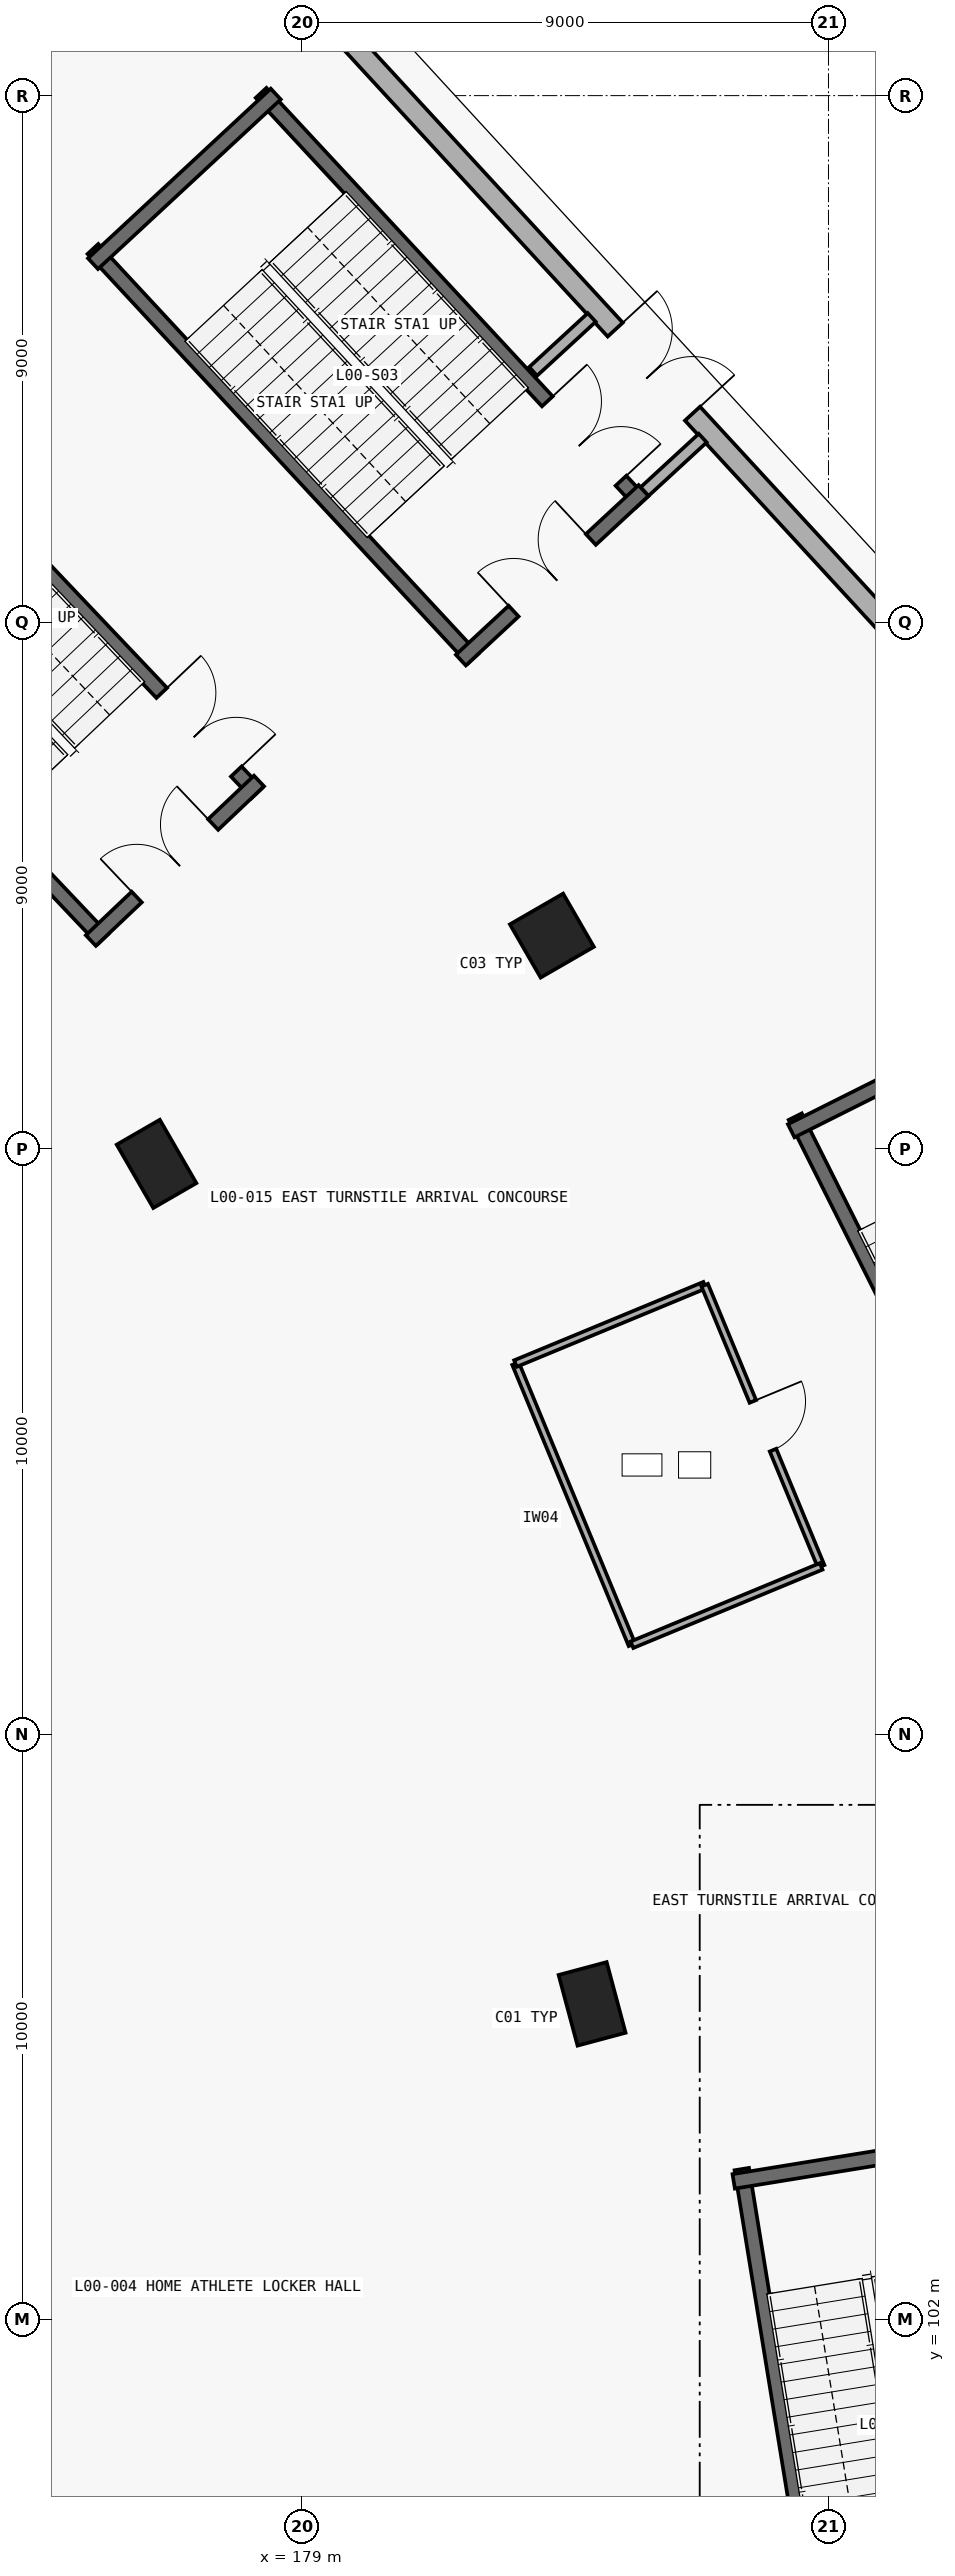
"""IFC4 building model, lengths in metres.
Left out: names, types, materials, properties, quantities, classifications, styles, units other than length and angle.
Written with IfcOpenShell. Run it as: python <this file> out.ifc"""

import sys

from ifc_helpers import new_model, si_unit, direction, frame, frame_2d, origin, origin_2d, place, context, subcontext, project, spatial, rectangle, extrude, element, fill, save


model = new_model("IFC4")
c1 = context("Model", 3, precision=1e-05, world=origin(), true_north=direction((0.0, 1.0)))
c2 = subcontext(c1, "Body", "Model", "MODEL_VIEW")
j1 = project(units=[si_unit("LENGTHUNIT", "METRE"), si_unit("PLANEANGLEUNIT", "RADIAN")], contexts=[c1])
p1 = place(None, origin())
s1 = spatial("IfcSite", under=j1, at=p1, CompositionType="ELEMENT")
p2 = place(p1, origin())
s2 = spatial("IfcBuilding", under=s1, at=p2, CompositionType="ELEMENT")
p3 = place(p2, origin())
s3 = spatial("IfcBuildingStorey", under=s2, at=p3, CompositionType="ELEMENT", Elevation=0.0)
for number, where, z_axis, x_axis in (
    (1, (183.961, 107.4, 0.0), (0.0, 0.0, 1.0), (0.966, 0.259, 0.0)),
    (2, (176.519, 121.75, 0.0), (0.0, 0.0, 1.0), (0.866, 0.5, 0.0)),
):
    element("IfcColumn", number, at=place(p3, frame(where, z_axis=z_axis, x_axis=x_axis)), inside=s3, PredefinedType="COLUMN", context=c2, shape_type="SweptSolid", body=[
        extrude(rectangle(XDim=0.85, YDim=1.25, at=origin_2d()), origin(), (0.0, 0.0, 1.0), 5.4),
    ])
p4 = place(p3, frame((183.274, 125.65, 0.0), z_axis=(0.0, 0.0, 1.0), x_axis=(0.866025403784, 0.5, 0.0)))
e3 = element("IfcColumn", 3, at=p4, inside=s3, PredefinedType="COLUMN", context=c2, shape_type="SweptSolid", body=[
    extrude(rectangle(XDim=1.05, YDim=1.05, at=origin_2d()), origin(), (0.0, 0.0, 1.0), 5.4),
])
p5 = place(p3, frame((176.208, 144.858, 0.0), z_axis=(0.0, 0.0, 1.0), x_axis=(0.677106454921, -0.735885078462, 0.0)))
e4 = element("IfcWall", 4, at=p5, inside=s3, PredefinedType="STANDARD", context=c2, shape_type="SweptSolid", body=[
    extrude(rectangle(XDim=20.128, YDim=0.35, at=frame_2d((10.064, 0.0))), origin(), (0.0, 0.0, 1.0), 4.165),
])
p6 = place(p5, frame((12.034, 0.0, 0.0)))
e5 = element("IfcOpeningElement", 5, at=p6, cuts=e4, PredefinedType="OPENING", context=c2, shape_type="SweptSolid", body=[
    extrude(rectangle(XDim=1.95, YDim=2.25, at=frame_2d((0.975, 1.125))), frame((0.0, 0.185, 0.0), z_axis=(0.0, -1.0, 0.0), x_axis=(1.0, 0.0, 0.0)), (0.0, 0.0, 1.0), 0.37),
])
p7 = place(p5, frame((1.218, 0.0, 0.0)))
e6 = element("IfcOpeningElement", 6, at=p7, cuts=e4, PredefinedType="OPENING", context=c2, shape_type="SweptSolid", body=[
    extrude(rectangle(XDim=3.2, YDim=2.6, at=frame_2d((1.6, 1.3))), frame((0.0, 0.185, 0.0), z_axis=(0.0, -1.0, 0.0), x_axis=(1.0, 0.0, 0.0)), (0.0, 0.0, 1.0), 0.37),
])
p8 = place(p3, frame((187.432, 122.557, 0.0), z_axis=(0.0, 0.0, 1.0), x_axis=(0.447919041961, -0.894074119885, 0.0)))
e7 = element("IfcWall", 7, at=p8, inside=s3, PredefinedType="SHEAR", context=c2, shape_type="SweptSolid", body=[
    extrude(rectangle(XDim=9.55, YDim=0.25, at=frame_2d((4.775, 0.0))), origin(), (0.0, 0.0, 1.0), 5.1),
])
p9 = place(p3, frame((191.172, 124.223, 0.0), z_axis=(0.0, 0.0, 1.0), x_axis=(-0.89409454548, -0.447878268888, 0.0)))
e8 = element("IfcWall", 8, at=p9, inside=s3, PredefinedType="SHEAR", context=c2, shape_type="SweptSolid", body=[
    extrude(rectangle(XDim=4.26, YDim=0.25, at=frame_2d((2.13, 0.0))), origin(), (0.0, 0.0, 1.0), 5.1),
])
p10 = place(p3, frame((178.305, 140.047, 0.0), z_axis=(0.0, 0.0, 1.0), x_axis=(0.680258890476, -0.732971924379, 0.0)))
e9 = element("IfcWall", 9, at=p10, inside=s3, PredefinedType="SHEAR", context=c2, shape_type="SweptSolid", body=[
    extrude(rectangle(XDim=9.55, YDim=0.25, at=frame_2d((4.775, 0.0))), origin(), (0.0, 0.0, 1.0), 5.1),
])
p11 = place(p10, frame((7.19, 0.0, 0.0)))
e10 = element("IfcOpeningElement", 10, at=p11, cuts=e9, PredefinedType="OPENING", context=c2, shape_type="SweptSolid", body=[
    extrude(rectangle(XDim=1.85, YDim=2.3, at=frame_2d((0.925, 1.15))), frame((0.0, 0.135, 0.0), z_axis=(0.0, -1.0, 0.0), x_axis=(1.0, 0.0, 0.0)), (0.0, 0.0, 1.0), 0.27),
])
p12 = place(p3, frame((175.432, 137.38, 0.0), z_axis=(0.0, 0.0, 1.0), x_axis=(0.680271637111, -0.732960094236, 0.0)))
e11 = element("IfcWall", 11, at=p12, inside=s3, PredefinedType="SHEAR", context=c2, shape_type="SweptSolid", body=[
    extrude(rectangle(XDim=9.55, YDim=0.25, at=frame_2d((4.775, 0.0))), origin(), (0.0, 0.0, 1.0), 5.1),
])
p13 = place(p3, frame((181.719, 130.356, 0.0), z_axis=(0.0, 0.0, 1.0), x_axis=(0.732977166505, 0.680253242096, 0.0)))
e12 = element("IfcWall", 12, at=p13, inside=s3, PredefinedType="SHEAR", context=c2, shape_type="SweptSolid", body=[
    extrude(rectangle(XDim=4.26, YDim=0.25, at=frame_2d((2.13, 0.0))), origin(), (0.0, 0.0, 1.0), 5.1),
])
p14 = place(p13, frame((1.23, 0.0, 0.0)))
e13 = element("IfcOpeningElement", 13, at=p14, cuts=e12, PredefinedType="OPENING", context=c2, shape_type="SweptSolid", body=[
    extrude(rectangle(XDim=1.8, YDim=2.25, at=frame_2d((0.9, 1.125))), frame((0.0, 0.135, 0.0), z_axis=(0.0, -1.0, 0.0), x_axis=(1.0, 0.0, 0.0)), (0.0, 0.0, 1.0), 0.27),
])
p15 = place(p3, frame((178.556, 140.027, 0.0), z_axis=(0.0, 0.0, 1.0), x_axis=(-0.73295064559, -0.680281817433, 0.0)))
e14 = element("IfcWall", 14, at=p15, inside=s3, PredefinedType="SHEAR", context=c2, shape_type="SweptSolid", body=[
    extrude(rectangle(XDim=4.26, YDim=0.25, at=frame_2d((2.13, 0.0))), origin(), (0.0, 0.0, 1.0), 5.1),
])
p16 = place(p3, frame((186.519, 104.578, 0.0), z_axis=(0.0, 0.0, 1.0), x_axis=(0.160690234322, -0.987004887827, 0.0)))
e15 = element("IfcWall", 15, at=p16, inside=s3, PredefinedType="SHEAR", context=c2, shape_type="SweptSolid", body=[
    extrude(rectangle(XDim=9.45, YDim=0.25, at=frame_2d((4.725, 0.0))), origin(), (0.0, 0.0, 1.0), 5.1),
])
p17 = place(p3, frame((190.289, 105.004, 0.0), z_axis=(0.0, 0.0, 1.0), x_axis=(-0.987009998221, -0.160658841684, 0.0)))
e16 = element("IfcWall", 16, at=p17, inside=s3, PredefinedType="SHEAR", context=c2, shape_type="SweptSolid", body=[
    extrude(rectangle(XDim=3.96, YDim=0.25, at=frame_2d((1.98, 0.0))), origin(), (0.0, 0.0, 1.0), 5.1),
])
p18 = place(p3, frame((171.728, 134.939, 0.0), z_axis=(0.0, 0.0, 1.0), x_axis=(0.68832701945, -0.725400519916, 0.0)))
e17 = element("IfcWall", 17, at=p18, inside=s3, PredefinedType="SHEAR", context=c2, shape_type="SweptSolid", body=[
    extrude(rectangle(XDim=9.45, YDim=0.25, at=frame_2d((4.725, 0.0))), origin(), (0.0, 0.0, 1.0), 5.1),
])
p19 = place(p18, frame((7.09, 0.0, 0.0)))
e18 = element("IfcOpeningElement", 18, at=p19, cuts=e17, PredefinedType="OPENING", context=c2, shape_type="SweptSolid", body=[
    extrude(rectangle(XDim=1.85, YDim=2.3, at=frame_2d((0.925, 1.15))), frame((0.0, 0.135, 0.0), z_axis=(0.0, -1.0, 0.0), x_axis=(1.0, 0.0, 0.0)), (0.0, 0.0, 1.0), 0.27),
])
p20 = place(p3, frame((169.102, 132.447, 0.0), z_axis=(0.0, 0.0, 1.0), x_axis=(0.68832701945, -0.725400519916, 0.0)))
e19 = element("IfcWall", 19, at=p20, inside=s3, PredefinedType="SHEAR", context=c2, shape_type="SweptSolid", body=[
    extrude(rectangle(XDim=9.45, YDim=0.25, at=frame_2d((4.725, 0.0))), origin(), (0.0, 0.0, 1.0), 5.1),
])
p21 = place(p3, frame((175.397, 125.566, 0.0), z_axis=(0.0, 0.0, 1.0), x_axis=(0.725390288694, 0.688337801569, 0.0)))
e20 = element("IfcWall", 20, at=p21, inside=s3, PredefinedType="SHEAR", context=c2, shape_type="SweptSolid", body=[
    extrude(rectangle(XDim=3.96, YDim=0.25, at=frame_2d((1.98, 0.0))), origin(), (0.0, 0.0, 1.0), 5.1),
])
p22 = place(p21, frame((1.08, 0.0, 0.0)))
e21 = element("IfcOpeningElement", 21, at=p22, cuts=e20, PredefinedType="OPENING", context=c2, shape_type="SweptSolid", body=[
    extrude(rectangle(XDim=1.8, YDim=2.25, at=frame_2d((0.9, 1.125))), frame((0.0, 0.135, 0.0), z_axis=(0.0, -1.0, 0.0), x_axis=(1.0, 0.0, 0.0)), (0.0, 0.0, 1.0), 0.27),
])
p23 = place(p3, frame((184.858, 133.236, 0.0), z_axis=(0.0, 0.0, 1.0), x_axis=(0.735725414691, 0.677279937823, 0.0)))
e22 = element("IfcWall", 22, at=p23, inside=s3, PredefinedType="PARTITIONING", context=c2, shape_type="SweptSolid", body=[
    extrude(rectangle(XDim=1.349, YDim=0.2, at=frame_2d((0.675, 0.0))), origin(), (0.0, 0.0, 1.0), 4.165),
])
p24 = place(p3, frame((182.954, 135.288, 0.0), z_axis=(0.0, 0.0, 1.0), x_axis=(0.73582732187, 0.677169219907, 0.0)))
e23 = element("IfcWall", 23, at=p24, inside=s3, PredefinedType="PARTITIONING", context=c2, shape_type="SweptSolid", body=[
    extrude(rectangle(XDim=1.361, YDim=0.2, at=frame_2d((0.681, 0.0))), origin(), (0.0, 0.0, 1.0), 4.165),
])
p25 = place(p3, frame((184.642, 113.535, 0.0), z_axis=(0.0, 0.0, 1.0), x_axis=(-0.38268766097, 0.923877780955, 0.0)))
e24 = element("IfcWall", 24, at=p25, inside=s3, PredefinedType="PARTITIONING", context=c2, shape_type="SweptSolid", body=[
    extrude(rectangle(XDim=5.2, YDim=0.12, at=frame_2d((2.6, 0.0))), origin(), (0.0, 0.0, 1.0), 4.617),
])
p26 = place(p3, frame((182.652, 118.339, 0.0), z_axis=(0.0, 0.0, 1.0), x_axis=(0.923904592733, 0.382622926034, 0.0)))
e25 = element("IfcWall", 25, at=p26, inside=s3, PredefinedType="PARTITIONING", context=c2, shape_type="SweptSolid", body=[
    extrude(rectangle(XDim=3.499, YDim=0.12, at=frame_2d((1.75, 0.0))), origin(), (0.0, 0.0, 1.0), 4.415),
])
p27 = place(p3, frame((185.885, 119.678, 0.0), z_axis=(0.0, 0.0, 1.0), x_axis=(0.382704261034, -0.923870904719, 0.0)))
e26 = element("IfcWall", 26, at=p27, inside=s3, PredefinedType="PARTITIONING", context=c2, shape_type="SweptSolid", body=[
    extrude(rectangle(XDim=5.2, YDim=0.12, at=frame_2d((2.6, 0.0))), origin(), (0.0, 0.0, 1.0), 4.415),
])
p28 = place(p27, frame((2.15, 0.0, 0.0)))
e27 = element("IfcOpeningElement", 27, at=p28, cuts=e26, PredefinedType="OPENING", context=c2, shape_type="SweptSolid", body=[
    extrude(rectangle(XDim=0.9, YDim=2.1, at=frame_2d((0.45, 1.05))), frame((0.0, 0.07, 0.0), z_axis=(0.0, -1.0, 0.0), x_axis=(1.0, 0.0, 0.0)), (0.0, 0.0, 1.0), 0.14),
])
p29 = place(p3, frame((187.875, 114.874, 0.0), z_axis=(0.0, 0.0, 1.0), x_axis=(-0.923879927009, -0.382682479961, 0.0)))
e28 = element("IfcWall", 28, at=p29, inside=s3, PredefinedType="PARTITIONING", context=c2, shape_type="SweptSolid", body=[
    extrude(rectangle(XDim=3.499, YDim=0.12, at=frame_2d((1.75, 0.0))), origin(), (0.0, 0.0, 1.0), 4.617),
])
p30 = place(p6, origin())
e29 = element("IfcDoor", 29, at=p30, inside=s3, OperationType="DOUBLE_DOOR_SINGLE_SWING", PredefinedType="DOOR", context=c2, shape_type="SweptSolid", body=[
    extrude(rectangle(XDim=1.95, YDim=2.25, at=frame_2d((0.975, 1.125))), frame((0.0, 0.025, 0.0), z_axis=(0.0, -1.0, 0.0), x_axis=(1.0, 0.0, 0.0)), (0.0, 0.0, 1.0), 0.05),
])
fill(e5, e29)
p31 = place(p14, origin())
e30 = element("IfcDoor", 30, at=p31, inside=s3, OperationType="DOUBLE_DOOR_SINGLE_SWING", PredefinedType="DOOR", context=c2, shape_type="SweptSolid", body=[
    extrude(rectangle(XDim=1.8, YDim=2.25, at=frame_2d((0.9, 1.125))), frame((0.0, 0.025, 0.0), z_axis=(0.0, -1.0, 0.0), x_axis=(1.0, 0.0, 0.0)), (0.0, 0.0, 1.0), 0.05),
])
fill(e13, e30)
p32 = place(p11, origin())
e31 = element("IfcDoor", 31, at=p32, inside=s3, OperationType="DOUBLE_DOOR_SINGLE_SWING", PredefinedType="DOOR", context=c2, shape_type="SweptSolid", body=[
    extrude(rectangle(XDim=1.85, YDim=2.3, at=frame_2d((0.925, 1.15))), frame((0.0, 0.025, 0.0), z_axis=(0.0, -1.0, 0.0), x_axis=(1.0, 0.0, 0.0)), (0.0, 0.0, 1.0), 0.05),
])
fill(e10, e31)
p33 = place(p22, origin())
e32 = element("IfcDoor", 32, at=p33, inside=s3, OperationType="DOUBLE_DOOR_SINGLE_SWING", PredefinedType="DOOR", context=c2, shape_type="SweptSolid", body=[
    extrude(rectangle(XDim=1.8, YDim=2.25, at=frame_2d((0.9, 1.125))), frame((0.0, 0.025, 0.0), z_axis=(0.0, -1.0, 0.0), x_axis=(1.0, 0.0, 0.0)), (0.0, 0.0, 1.0), 0.05),
])
fill(e21, e32)
p34 = place(p19, origin())
e33 = element("IfcDoor", 33, at=p34, inside=s3, OperationType="DOUBLE_DOOR_SINGLE_SWING", PredefinedType="DOOR", context=c2, shape_type="SweptSolid", body=[
    extrude(rectangle(XDim=1.85, YDim=2.3, at=frame_2d((0.925, 1.15))), frame((0.0, 0.025, 0.0), z_axis=(0.0, -1.0, 0.0), x_axis=(1.0, 0.0, 0.0)), (0.0, 0.0, 1.0), 0.05),
])
fill(e18, e33)
p35 = place(p28, origin())
e34 = element("IfcDoor", 34, at=p35, inside=s3, OperationType="SINGLE_SWING_LEFT", PredefinedType="DOOR", context=c2, shape_type="SweptSolid", body=[
    extrude(rectangle(XDim=0.9, YDim=2.1, at=frame_2d((0.45, 1.05))), frame((0.0, 0.025, 0.0), z_axis=(0.0, -1.0, 0.0), x_axis=(1.0, 0.0, 0.0)), (0.0, 0.0, 1.0), 0.05),
])
fill(e27, e34)
save(model, sys.argv[1])
